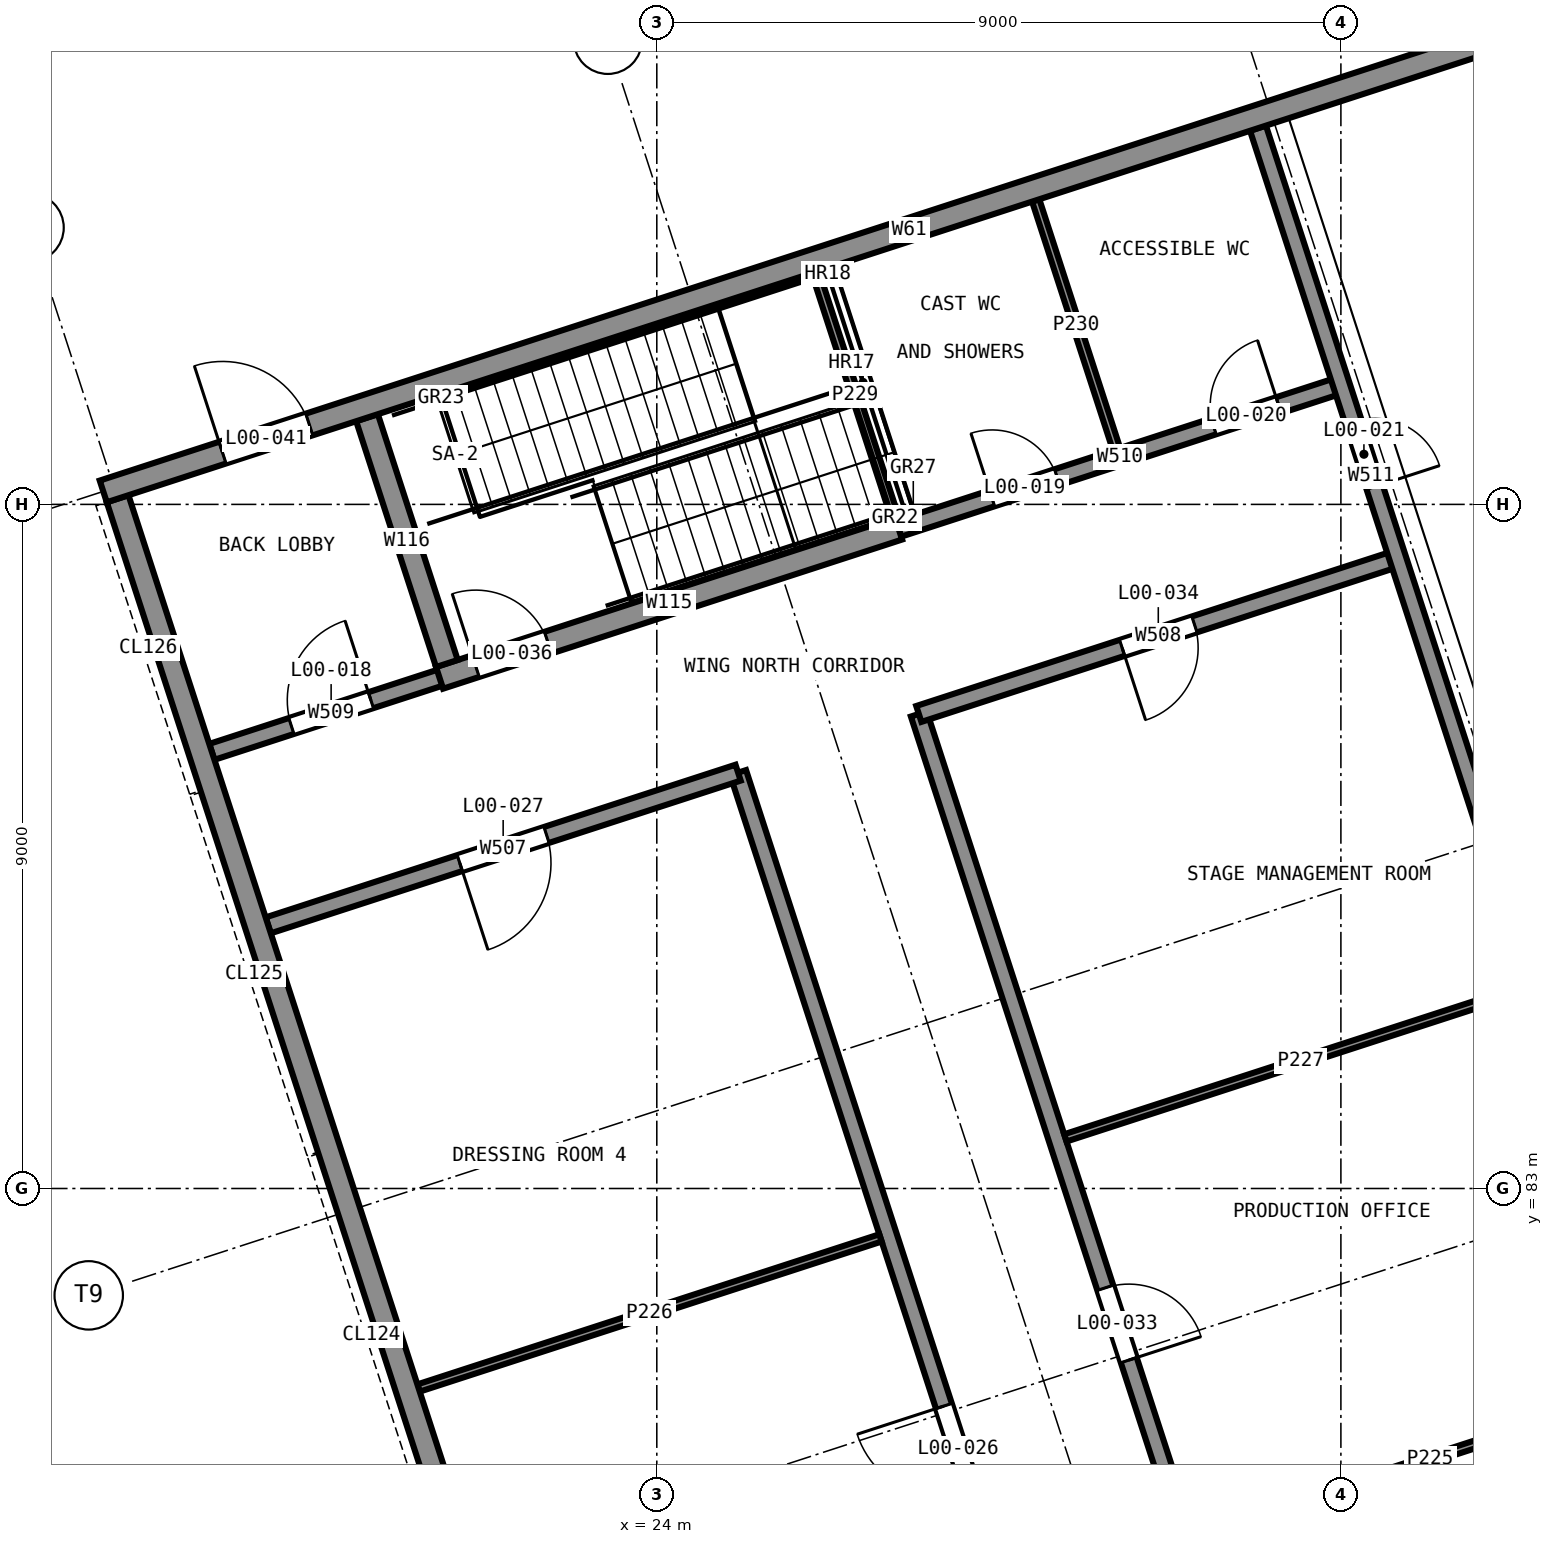
"""IFC4 building model, lengths in metres.
Left out: names, types, materials, properties, quantities, classifications, styles, units other than length and angle.
Written with IfcOpenShell. Run it as: python <this file> out.ifc"""

import sys

from ifc_helpers import new_model, si_unit, direction, frame, frame_2d, origin, place, context, subcontext, project, spatial, rectangle, extrude, element, fill, save


model = new_model("IFC4")
c1 = context("Model", 3, precision=1e-05, world=origin(), true_north=direction((0.0, 1.0)))
c2 = subcontext(c1, "Body", "Model", "MODEL_VIEW")
j1 = project(units=[si_unit("LENGTHUNIT", "METRE"), si_unit("PLANEANGLEUNIT", "RADIAN")], contexts=[c1])
p1 = place(None, origin())
s1 = spatial("IfcSite", under=j1, at=p1, CompositionType="ELEMENT")
p2 = place(p1, origin())
s2 = spatial("IfcBuilding", under=s1, at=p2, CompositionType="ELEMENT")
p3 = place(p2, origin())
s3 = spatial("IfcBuildingStorey", under=s2, at=p3, CompositionType="ELEMENT", Elevation=0.0)
p4 = place(p3, frame((33.501, 41.003, 0.0), z_axis=(0.0, 0.0, 1.0), x_axis=(-0.309017194826, 0.951056451165, 0.0)))
e1 = element("IfcWall", 1, at=p4, inside=s3, PredefinedType="SOLIDWALL", context=c2, shape_type="SweptSolid", body=[
    extrude(rectangle(XDim=53.7, YDim=0.3, at=frame_2d((26.85, 0.0))), origin(), (0.0, 0.0, 1.0), 5.5),
])
p5 = place(p4, frame((31.55, 0.0, 0.9)))
e2 = element("IfcOpeningElement", 2, at=p5, cuts=e1, PredefinedType="OPENING", context=c2, shape_type="SweptSolid", body=[
    extrude(rectangle(XDim=3.6, YDim=2.1, at=frame_2d((1.8, 1.05))), frame((0.0, 0.16, 0.0), z_axis=(0.0, -1.0, 0.0), x_axis=(1.0, 0.0, 0.0)), (0.0, 0.0, 1.0), 0.32),
])
p6 = place(p4, frame((3.0, 0.0, 0.0)))
e3 = element("IfcOpeningElement", 3, at=p6, cuts=e1, PredefinedType="OPENING", context=c2, shape_type="SweptSolid", body=[
    extrude(rectangle(XDim=1.1, YDim=2.1, at=frame_2d((0.55, 1.05))), frame((0.0, 0.16, 0.0), z_axis=(0.0, -1.0, 0.0), x_axis=(1.0, 0.0, 0.0)), (0.0, 0.0, 1.0), 0.32),
])
p7 = place(p4, frame((12.6, 0.0, 0.0)))
e4 = element("IfcOpeningElement", 4, at=p7, cuts=e1, PredefinedType="OPENING", context=c2, shape_type="SweptSolid", body=[
    extrude(rectangle(XDim=4.5, YDim=4.5, at=frame_2d((2.25, 2.25))), frame((0.0, 0.16, 0.0), z_axis=(0.0, -1.0, 0.0), x_axis=(1.0, 0.0, 0.0)), (0.0, 0.0, 1.0), 0.32),
])
p8 = place(p4, frame((19.1, 0.0, 0.0)))
e5 = element("IfcOpeningElement", 5, at=p8, cuts=e1, PredefinedType="OPENING", context=c2, shape_type="SweptSolid", body=[
    extrude(rectangle(XDim=4.5, YDim=4.5, at=frame_2d((2.25, 2.25))), frame((0.0, 0.16, 0.0), z_axis=(0.0, -1.0, 0.0), x_axis=(1.0, 0.0, 0.0)), (0.0, 0.0, 1.0), 0.32),
])
p9 = place(p3, frame((16.718, 92.171, 0.0), z_axis=(0.0, 0.0, 1.0), x_axis=(0.951055789165, 0.309019232243, 0.0)))
e6 = element("IfcWall", 6, at=p9, inside=s3, PredefinedType="SOLIDWALL", context=c2, shape_type="SweptSolid", body=[
    extrude(rectangle(XDim=22.3, YDim=0.3, at=frame_2d((11.15, 0.0))), origin(), (0.0, 0.0, 1.0), 5.5),
])
p10 = place(p9, frame((1.65, 0.0, 0.0)))
e7 = element("IfcOpeningElement", 7, at=p10, cuts=e6, PredefinedType="OPENING", context=c2, shape_type="SweptSolid", body=[
    extrude(rectangle(XDim=1.2, YDim=2.1, at=frame_2d((0.6, 1.05))), frame((0.0, 0.16, 0.0), z_axis=(0.0, -1.0, 0.0), x_axis=(1.0, 0.0, 0.0)), (0.0, 0.0, 1.0), 0.32),
])
p11 = place(p3, frame((27.181, 91.68, 0.0), z_axis=(0.0, 0.0, 1.0), x_axis=(-0.951051301895, -0.309033042189, 0.0)))
e8 = element("IfcWall", 8, at=p11, inside=s3, PredefinedType="SOLIDWALL", context=c2, shape_type="SweptSolid", body=[
    extrude(rectangle(XDim=6.35, YDim=0.3, at=frame_2d((3.175, 0.0))), origin(), (0.0, 0.0, 1.0), 5.2),
])
p12 = place(p11, frame((4.85, 0.0, 0.0)))
e9 = element("IfcOpeningElement", 9, at=p12, cuts=e8, PredefinedType="OPENING", context=c2, shape_type="SweptSolid", body=[
    extrude(rectangle(XDim=1.0, YDim=2.1, at=frame_2d((0.5, 1.05))), frame((0.0, 0.16, 0.0), z_axis=(0.0, -1.0, 0.0), x_axis=(1.0, 0.0, 0.0)), (0.0, 0.0, 1.0), 0.32),
])
p13 = place(p3, frame((21.238, 89.907, 0.0), z_axis=(0.0, 0.0, 1.0), x_axis=(-0.309066587596, 0.951040401051, 0.0)))
e10 = element("IfcWall", 10, at=p13, inside=s3, PredefinedType="SOLIDWALL", context=c2, shape_type="SweptSolid", body=[
    extrude(rectangle(XDim=3.4, YDim=0.3, at=frame_2d((1.7, 0.0))), origin(), (0.0, 0.0, 1.0), 5.2),
])
p14 = place(p3, frame((37.956, 48.812, 0.0), z_axis=(0.0, 0.0, 1.0), x_axis=(-0.30901736393, 0.951056396219, 0.0)))
e11 = element("IfcWall", 11, at=p14, inside=s3, PredefinedType="SOLIDWALL", context=c2, shape_type="SweptSolid", body=[
    extrude(rectangle(XDim=41.7, YDim=0.22, at=frame_2d((20.85, 0.0))), origin(), (0.0, 0.0, 1.0), 5.2),
])
p15 = place(p14, frame((2.009, 0.0, 0.0)))
e12 = element("IfcOpeningElement", 12, at=p15, cuts=e11, PredefinedType="OPENING", context=c2, shape_type="SweptSolid", body=[
    extrude(rectangle(XDim=1.0, YDim=2.1, at=frame_2d((0.5, 1.05))), frame((0.0, 0.12, 0.0), z_axis=(0.0, -1.0, 0.0), x_axis=(1.0, 0.0, 0.0)), (0.0, 0.0, 1.0), 0.24),
])
p16 = place(p14, frame((11.495, 0.0, 0.0)))
e13 = element("IfcOpeningElement", 13, at=p16, cuts=e11, PredefinedType="OPENING", context=c2, shape_type="SweptSolid", body=[
    extrude(rectangle(XDim=1.0, YDim=2.1, at=frame_2d((0.5, 1.05))), frame((0.0, 0.12, 0.0), z_axis=(0.0, -1.0, 0.0), x_axis=(1.0, 0.0, 0.0)), (0.0, 0.0, 1.0), 0.24),
])
p17 = place(p14, frame((21.7, 0.0, 0.0)))
e14 = element("IfcOpeningElement", 14, at=p17, cuts=e11, PredefinedType="OPENING", context=c2, shape_type="SweptSolid", body=[
    extrude(rectangle(XDim=1.2, YDim=2.1, at=frame_2d((0.6, 1.05))), frame((0.0, 0.12, 0.0), z_axis=(0.0, -1.0, 0.0), x_axis=(1.0, 0.0, 0.0)), (0.0, 0.0, 1.0), 0.24),
])
p18 = place(p14, frame((26.7, 0.0, 0.0)))
e15 = element("IfcOpeningElement", 15, at=p18, cuts=e11, PredefinedType="OPENING", context=c2, shape_type="SweptSolid", body=[
    extrude(rectangle(XDim=1.2, YDim=2.1, at=frame_2d((0.6, 1.05))), frame((0.0, 0.12, 0.0), z_axis=(0.0, -1.0, 0.0), x_axis=(1.0, 0.0, 0.0)), (0.0, 0.0, 1.0), 0.24),
])
p19 = place(p14, frame((31.739, 0.0, 0.0)))
e16 = element("IfcOpeningElement", 16, at=p19, cuts=e11, PredefinedType="OPENING", context=c2, shape_type="SweptSolid", body=[
    extrude(rectangle(XDim=1.2, YDim=2.1, at=frame_2d((0.6, 1.05))), frame((0.0, 0.12, 0.0), z_axis=(0.0, -1.0, 0.0), x_axis=(1.0, 0.0, 0.0)), (0.0, 0.0, 1.0), 0.24),
])
p20 = place(p3, frame((40.333, 49.584, 0.0), z_axis=(0.0, 0.0, 1.0), x_axis=(-0.309015643281, 0.951056955291, 0.0)))
e17 = element("IfcWall", 17, at=p20, inside=s3, PredefinedType="SOLIDWALL", context=c2, shape_type="SweptSolid", body=[
    extrude(rectangle(XDim=41.7, YDim=0.22, at=frame_2d((20.85, 0.0))), origin(), (0.0, 0.0, 1.0), 5.2),
])
p21 = place(p20, frame((1.9, 0.0, 0.0)))
e18 = element("IfcOpeningElement", 18, at=p21, cuts=e17, PredefinedType="OPENING", context=c2, shape_type="SweptSolid", body=[
    extrude(rectangle(XDim=1.2, YDim=2.1, at=frame_2d((0.6, 1.05))), frame((0.0, 0.12, 0.0), z_axis=(0.0, -1.0, 0.0), x_axis=(1.0, 0.0, 0.0)), (0.0, 0.0, 1.0), 0.24),
])
p22 = place(p20, frame((8.185, 0.0, 0.0)))
e19 = element("IfcOpeningElement", 19, at=p22, cuts=e17, PredefinedType="OPENING", context=c2, shape_type="SweptSolid", body=[
    extrude(rectangle(XDim=1.2, YDim=2.1, at=frame_2d((0.6, 1.05))), frame((0.0, 0.12, 0.0), z_axis=(0.0, -1.0, 0.0), x_axis=(1.0, 0.0, 0.0)), (0.0, 0.0, 1.0), 0.24),
])
p23 = place(p20, frame((16.475, 0.0, 0.0)))
e20 = element("IfcOpeningElement", 20, at=p23, cuts=e17, PredefinedType="OPENING", context=c2, shape_type="SweptSolid", body=[
    extrude(rectangle(XDim=1.0, YDim=2.1, at=frame_2d((0.5, 1.05))), frame((0.0, 0.12, 0.0), z_axis=(0.0, -1.0, 0.0), x_axis=(1.0, 0.0, 0.0)), (0.0, 0.0, 1.0), 0.24),
])
p24 = place(p20, frame((23.05, 0.0, 0.0)))
e21 = element("IfcOpeningElement", 21, at=p24, cuts=e17, PredefinedType="OPENING", context=c2, shape_type="SweptSolid", body=[
    extrude(rectangle(XDim=1.0, YDim=2.1, at=frame_2d((0.5, 1.05))), frame((0.0, 0.12, 0.0), z_axis=(0.0, -1.0, 0.0), x_axis=(1.0, 0.0, 0.0)), (0.0, 0.0, 1.0), 0.24),
])
p25 = place(p20, frame((27.3, 0.0, 0.0)))
e22 = element("IfcOpeningElement", 22, at=p25, cuts=e17, PredefinedType="OPENING", context=c2, shape_type="SweptSolid", body=[
    extrude(rectangle(XDim=1.0, YDim=2.1, at=frame_2d((0.5, 1.05))), frame((0.0, 0.12, 0.0), z_axis=(0.0, -1.0, 0.0), x_axis=(1.0, 0.0, 0.0)), (0.0, 0.0, 1.0), 0.24),
])
p26 = place(p20, frame((32.761, 0.0, 0.0)))
e23 = element("IfcOpeningElement", 23, at=p26, cuts=e17, PredefinedType="OPENING", context=c2, shape_type="SweptSolid", body=[
    extrude(rectangle(XDim=1.0, YDim=2.1, at=frame_2d((0.5, 1.05))), frame((0.0, 0.12, 0.0), z_axis=(0.0, -1.0, 0.0), x_axis=(1.0, 0.0, 0.0)), (0.0, 0.0, 1.0), 0.24),
])
p27 = place(p3, frame((18.888, 86.462, 0.0), z_axis=(0.0, 0.0, 1.0), x_axis=(0.951059735424, 0.30900708674, 0.0)))
e24 = element("IfcWall", 24, at=p27, inside=s3, PredefinedType="SOLIDWALL", context=c2, shape_type="SweptSolid", body=[
    extrude(rectangle(XDim=6.5, YDim=0.22, at=frame_2d((3.25, 0.0))), origin(), (0.0, 0.0, 1.0), 5.2),
])
p28 = place(p27, frame((2.65, 0.0, 0.0)))
e25 = element("IfcOpeningElement", 25, at=p28, cuts=e24, PredefinedType="OPENING", context=c2, shape_type="SweptSolid", body=[
    extrude(rectangle(XDim=1.2, YDim=2.1, at=frame_2d((0.6, 1.05))), frame((0.0, 0.12, 0.0), z_axis=(0.0, -1.0, 0.0), x_axis=(1.0, 0.0, 0.0)), (0.0, 0.0, 1.0), 0.24),
])
p29 = place(p3, frame((27.447, 89.243, 0.0), z_axis=(0.0, 0.0, 1.0), x_axis=(0.951062229373, 0.308999410776, 0.0)))
e26 = element("IfcWall", 26, at=p29, inside=s3, PredefinedType="SOLIDWALL", context=c2, shape_type="SweptSolid", body=[
    extrude(rectangle(XDim=6.625, YDim=0.22, at=frame_2d((3.312, 0.0))), origin(), (0.0, 0.0, 1.0), 5.2),
])
p30 = place(p29, frame((2.812, 0.0, 0.0)))
e27 = element("IfcOpeningElement", 27, at=p30, cuts=e26, PredefinedType="OPENING", context=c2, shape_type="SweptSolid", body=[
    extrude(rectangle(XDim=1.0, YDim=2.1, at=frame_2d((0.5, 1.05))), frame((0.0, 0.12, 0.0), z_axis=(0.0, -1.0, 0.0), x_axis=(1.0, 0.0, 0.0)), (0.0, 0.0, 1.0), 0.24),
])
p31 = place(p3, frame((18.146, 88.744, 0.0), z_axis=(0.0, 0.0, 1.0), x_axis=(0.951053095941, 0.309027520945, 0.0)))
e28 = element("IfcWall", 28, at=p31, inside=s3, PredefinedType="SOLIDWALL", context=c2, shape_type="SweptSolid", body=[
    extrude(rectangle(XDim=3.3, YDim=0.22, at=frame_2d((1.65, 0.0))), origin(), (0.0, 0.0, 1.0), 5.2),
])
p32 = place(p31, frame((1.1, 0.0, 0.0)))
e29 = element("IfcOpeningElement", 29, at=p32, cuts=e28, PredefinedType="OPENING", context=c2, shape_type="SweptSolid", body=[
    extrude(rectangle(XDim=1.1, YDim=2.1, at=frame_2d((0.55, 1.05))), frame((0.0, 0.12, 0.0), z_axis=(0.0, -1.0, 0.0), x_axis=(1.0, 0.0, 0.0)), (0.0, 0.0, 1.0), 0.24),
])
p33 = place(p3, frame((27.181, 91.68, 0.0), z_axis=(0.0, 0.0, 1.0), x_axis=(0.951063356831, 0.308995940577, 0.0)))
e30 = element("IfcWall", 30, at=p33, inside=s3, PredefinedType="SOLIDWALL", context=c2, shape_type="SweptSolid", body=[
    extrude(rectangle(XDim=6.125, YDim=0.22, at=frame_2d((3.062, 0.0))), origin(), (0.0, 0.0, 1.0), 5.2),
])
p34 = place(p33, frame((1.293, 0.0, 0.0)))
e31 = element("IfcOpeningElement", 31, at=p34, cuts=e30, PredefinedType="OPENING", context=c2, shape_type="SweptSolid", body=[
    extrude(rectangle(XDim=0.9, YDim=2.1, at=frame_2d((0.45, 1.05))), frame((0.0, 0.12, 0.0), z_axis=(0.0, -1.0, 0.0), x_axis=(1.0, 0.0, 0.0)), (0.0, 0.0, 1.0), 0.24),
])
p35 = place(p33, frame((4.357, 0.0, 0.0)))
e32 = element("IfcOpeningElement", 32, at=p35, cuts=e30, PredefinedType="OPENING", context=c2, shape_type="SweptSolid", body=[
    extrude(rectangle(XDim=0.9, YDim=2.1, at=frame_2d((0.45, 1.05))), frame((0.0, 0.12, 0.0), z_axis=(0.0, -1.0, 0.0), x_axis=(1.0, 0.0, 0.0)), (0.0, 0.0, 1.0), 0.24),
])
p36 = place(p3, frame((34.884, 87.795, 0.0), z_axis=(0.0, 0.0, 1.0), x_axis=(-0.309027569133, 0.951053080283, 0.0)))
e33 = element("IfcWall", 33, at=p36, inside=s3, PredefinedType="SOLIDWALL", context=c2, shape_type="SweptSolid", body=[
    extrude(rectangle(XDim=9.625, YDim=0.22, at=frame_2d((4.812, 0.0))), origin(), (0.0, 0.0, 1.0), 5.2),
])
p37 = place(p36, frame((4.665, 0.0, 0.0)))
e34 = element("IfcOpeningElement", 34, at=p37, cuts=e33, PredefinedType="OPENING", context=c2, shape_type="SweptSolid", body=[
    extrude(rectangle(XDim=0.9, YDim=2.1, at=frame_2d((0.45, 1.05))), frame((0.0, 0.12, 0.0), z_axis=(0.0, -1.0, 0.0), x_axis=(1.0, 0.0, 0.0)), (0.0, 0.0, 1.0), 0.24),
])
p38 = place(p3, frame((31.075, 78.435, 0.0), z_axis=(0.0, 0.0, 1.0), x_axis=(0.951058024796, 0.309012351648, 0.0)))
e35 = element("IfcWall", 35, at=p38, inside=s3, PredefinedType="PARTITIONING", context=c2, shape_type="SweptSolid", body=[
    extrude(rectangle(XDim=6.515, YDim=0.1, at=frame_2d((3.257, 0.0))), origin(), (0.0, 0.0, 1.0), 5.2),
])
p39 = place(p3, frame((20.865, 80.375, 0.0), z_axis=(0.0, 0.0, 1.0), x_axis=(0.951055405517, 0.309020412977, 0.0)))
e36 = element("IfcWall", 36, at=p39, inside=s3, PredefinedType="PARTITIONING", context=c2, shape_type="SweptSolid", body=[
    extrude(rectangle(XDim=6.39, YDim=0.1, at=frame_2d((3.195, 0.0))), origin(), (0.0, 0.0, 1.0), 5.2),
])
p40 = place(p3, frame((29.375, 83.666, 0.0), z_axis=(0.0, 0.0, 1.0), x_axis=(0.951061602966, 0.309001338773, 0.0)))
e37 = element("IfcWall", 37, at=p40, inside=s3, PredefinedType="PARTITIONING", context=c2, shape_type="SweptSolid", body=[
    extrude(rectangle(XDim=6.515, YDim=0.1, at=frame_2d((3.258, 0.0))), origin(), (0.0, 0.0, 1.0), 5.2),
])
p41 = place(p3, frame((27.135, 91.823, 0.0), z_axis=(0.0, 0.0, 1.0), x_axis=(-0.308980533303, 0.951068362443, 0.0)))
e38 = element("IfcWall", 38, at=p41, inside=s3, PredefinedType="PARTITIONING", context=c2, shape_type="SweptSolid", body=[
    extrude(rectangle(XDim=3.4, YDim=0.1, at=frame_2d((1.7, 0.0))), origin(), (0.0, 0.0, 1.0), 5.2),
])
p42 = place(p3, frame((30.048, 92.727, 0.0), z_axis=(0.0, 0.0, 1.0), x_axis=(-0.309021877853, 0.951054929543, 0.0)))
e39 = element("IfcWall", 39, at=p42, inside=s3, PredefinedType="PARTITIONING", context=c2, shape_type="SweptSolid", body=[
    extrude(rectangle(XDim=3.44, YDim=0.1, at=frame_2d((1.72, 0.0))), origin(), (0.0, 0.0, 1.0), 5.2),
])
p43 = place(p32, origin())
e40 = element("IfcDoor", 40, at=p43, inside=s3, OperationType="SINGLE_SWING_LEFT", PredefinedType="DOOR", context=c2, shape_type="SweptSolid", body=[
    extrude(rectangle(XDim=1.1, YDim=2.1, at=frame_2d((0.55, 1.05))), frame((0.0, 0.025, 0.0), z_axis=(0.0, -1.0, 0.0), x_axis=(1.0, 0.0, 0.0)), (0.0, 0.0, 1.0), 0.05),
])
fill(e29, e40)
p44 = place(p34, origin())
e41 = element("IfcDoor", 41, at=p44, inside=s3, OperationType="SINGLE_SWING_RIGHT", PredefinedType="DOOR", context=c2, shape_type="SweptSolid", body=[
    extrude(rectangle(XDim=0.9, YDim=2.1, at=frame_2d((0.45, 1.05))), frame((0.0, 0.025, 0.0), z_axis=(0.0, -1.0, 0.0), x_axis=(1.0, 0.0, 0.0)), (0.0, 0.0, 1.0), 0.05),
])
fill(e31, e41)
p45 = place(p35, origin())
e42 = element("IfcDoor", 42, at=p45, inside=s3, OperationType="SINGLE_SWING_LEFT", PredefinedType="DOOR", context=c2, shape_type="SweptSolid", body=[
    extrude(rectangle(XDim=0.9, YDim=2.1, at=frame_2d((0.45, 1.05))), frame((0.0, 0.025, 0.0), z_axis=(0.0, -1.0, 0.0), x_axis=(1.0, 0.0, 0.0)), (0.0, 0.0, 1.0), 0.05),
])
fill(e32, e42)
p46 = place(p37, frame((0.9, 0.0, 0.0), z_axis=(0.0, 0.0, 1.0), x_axis=(-1.0, 0.0, 0.0)))
e43 = element("IfcDoor", 43, at=p46, inside=s3, OperationType="SINGLE_SWING_LEFT", PredefinedType="DOOR", context=c2, shape_type="SweptSolid", body=[
    extrude(rectangle(XDim=0.9, YDim=2.1, at=frame_2d((0.45, 1.05))), frame((0.0, 0.025, 0.0), z_axis=(0.0, -1.0, 0.0), x_axis=(1.0, 0.0, 0.0)), (0.0, 0.0, 1.0), 0.05),
])
fill(e34, e43)
p47 = place(p19, origin())
e44 = element("IfcDoor", 44, at=p47, inside=s3, OperationType="SINGLE_SWING_LEFT", PredefinedType="DOOR", context=c2, shape_type="SweptSolid", body=[
    extrude(rectangle(XDim=1.2, YDim=2.1, at=frame_2d((0.6, 1.05))), frame((0.0, 0.025, 0.0), z_axis=(0.0, -1.0, 0.0), x_axis=(1.0, 0.0, 0.0)), (0.0, 0.0, 1.0), 0.05),
])
fill(e16, e44)
p48 = place(p28, frame((1.2, 0.0, 0.0), z_axis=(0.0, 0.0, 1.0), x_axis=(-1.0, 0.0, 0.0)))
e45 = element("IfcDoor", 45, at=p48, inside=s3, OperationType="SINGLE_SWING_LEFT", PredefinedType="DOOR", context=c2, shape_type="SweptSolid", body=[
    extrude(rectangle(XDim=1.2, YDim=2.1, at=frame_2d((0.6, 1.05))), frame((0.0, 0.025, 0.0), z_axis=(0.0, -1.0, 0.0), x_axis=(1.0, 0.0, 0.0)), (0.0, 0.0, 1.0), 0.05),
])
fill(e25, e45)
p49 = place(p26, frame((1.0, 0.0, 0.0), z_axis=(0.0, 0.0, 1.0), x_axis=(-1.0, 0.0, 0.0)))
e46 = element("IfcDoor", 46, at=p49, inside=s3, OperationType="SINGLE_SWING_LEFT", PredefinedType="DOOR", context=c2, shape_type="SweptSolid", body=[
    extrude(rectangle(XDim=1.0, YDim=2.1, at=frame_2d((0.5, 1.05))), frame((0.0, 0.025, 0.0), z_axis=(0.0, -1.0, 0.0), x_axis=(1.0, 0.0, 0.0)), (0.0, 0.0, 1.0), 0.05),
])
fill(e23, e46)
p50 = place(p30, frame((1.0, 0.0, 0.0), z_axis=(0.0, 0.0, 1.0), x_axis=(-1.0, 0.0, 0.0)))
e47 = element("IfcDoor", 47, at=p50, inside=s3, OperationType="SINGLE_SWING_LEFT", PredefinedType="DOOR", context=c2, shape_type="SweptSolid", body=[
    extrude(rectangle(XDim=1.0, YDim=2.1, at=frame_2d((0.5, 1.05))), frame((0.0, 0.025, 0.0), z_axis=(0.0, -1.0, 0.0), x_axis=(1.0, 0.0, 0.0)), (0.0, 0.0, 1.0), 0.05),
])
fill(e27, e47)
p51 = place(p12, frame((1.0, 0.0, 0.0), z_axis=(0.0, 0.0, 1.0), x_axis=(-1.0, 0.0, 0.0)))
e48 = element("IfcDoor", 48, at=p51, inside=s3, OperationType="SINGLE_SWING_RIGHT", PredefinedType="DOOR", context=c2, shape_type="SweptSolid", body=[
    extrude(rectangle(XDim=1.0, YDim=2.1, at=frame_2d((0.5, 1.05))), frame((0.0, 0.025, 0.0), z_axis=(0.0, -1.0, 0.0), x_axis=(1.0, 0.0, 0.0)), (0.0, 0.0, 1.0), 0.05),
])
fill(e9, e48)
p52 = place(p10, origin())
e49 = element("IfcDoor", 49, at=p52, inside=s3, OperationType="SINGLE_SWING_RIGHT", PredefinedType="DOOR", context=c2, shape_type="SweptSolid", body=[
    extrude(rectangle(XDim=1.2, YDim=2.1, at=frame_2d((0.6, 1.05))), frame((0.0, 0.025, 0.0), z_axis=(0.0, -1.0, 0.0), x_axis=(1.0, 0.0, 0.0)), (0.0, 0.0, 1.0), 0.05),
])
fill(e7, e49)
save(model, sys.argv[1])
